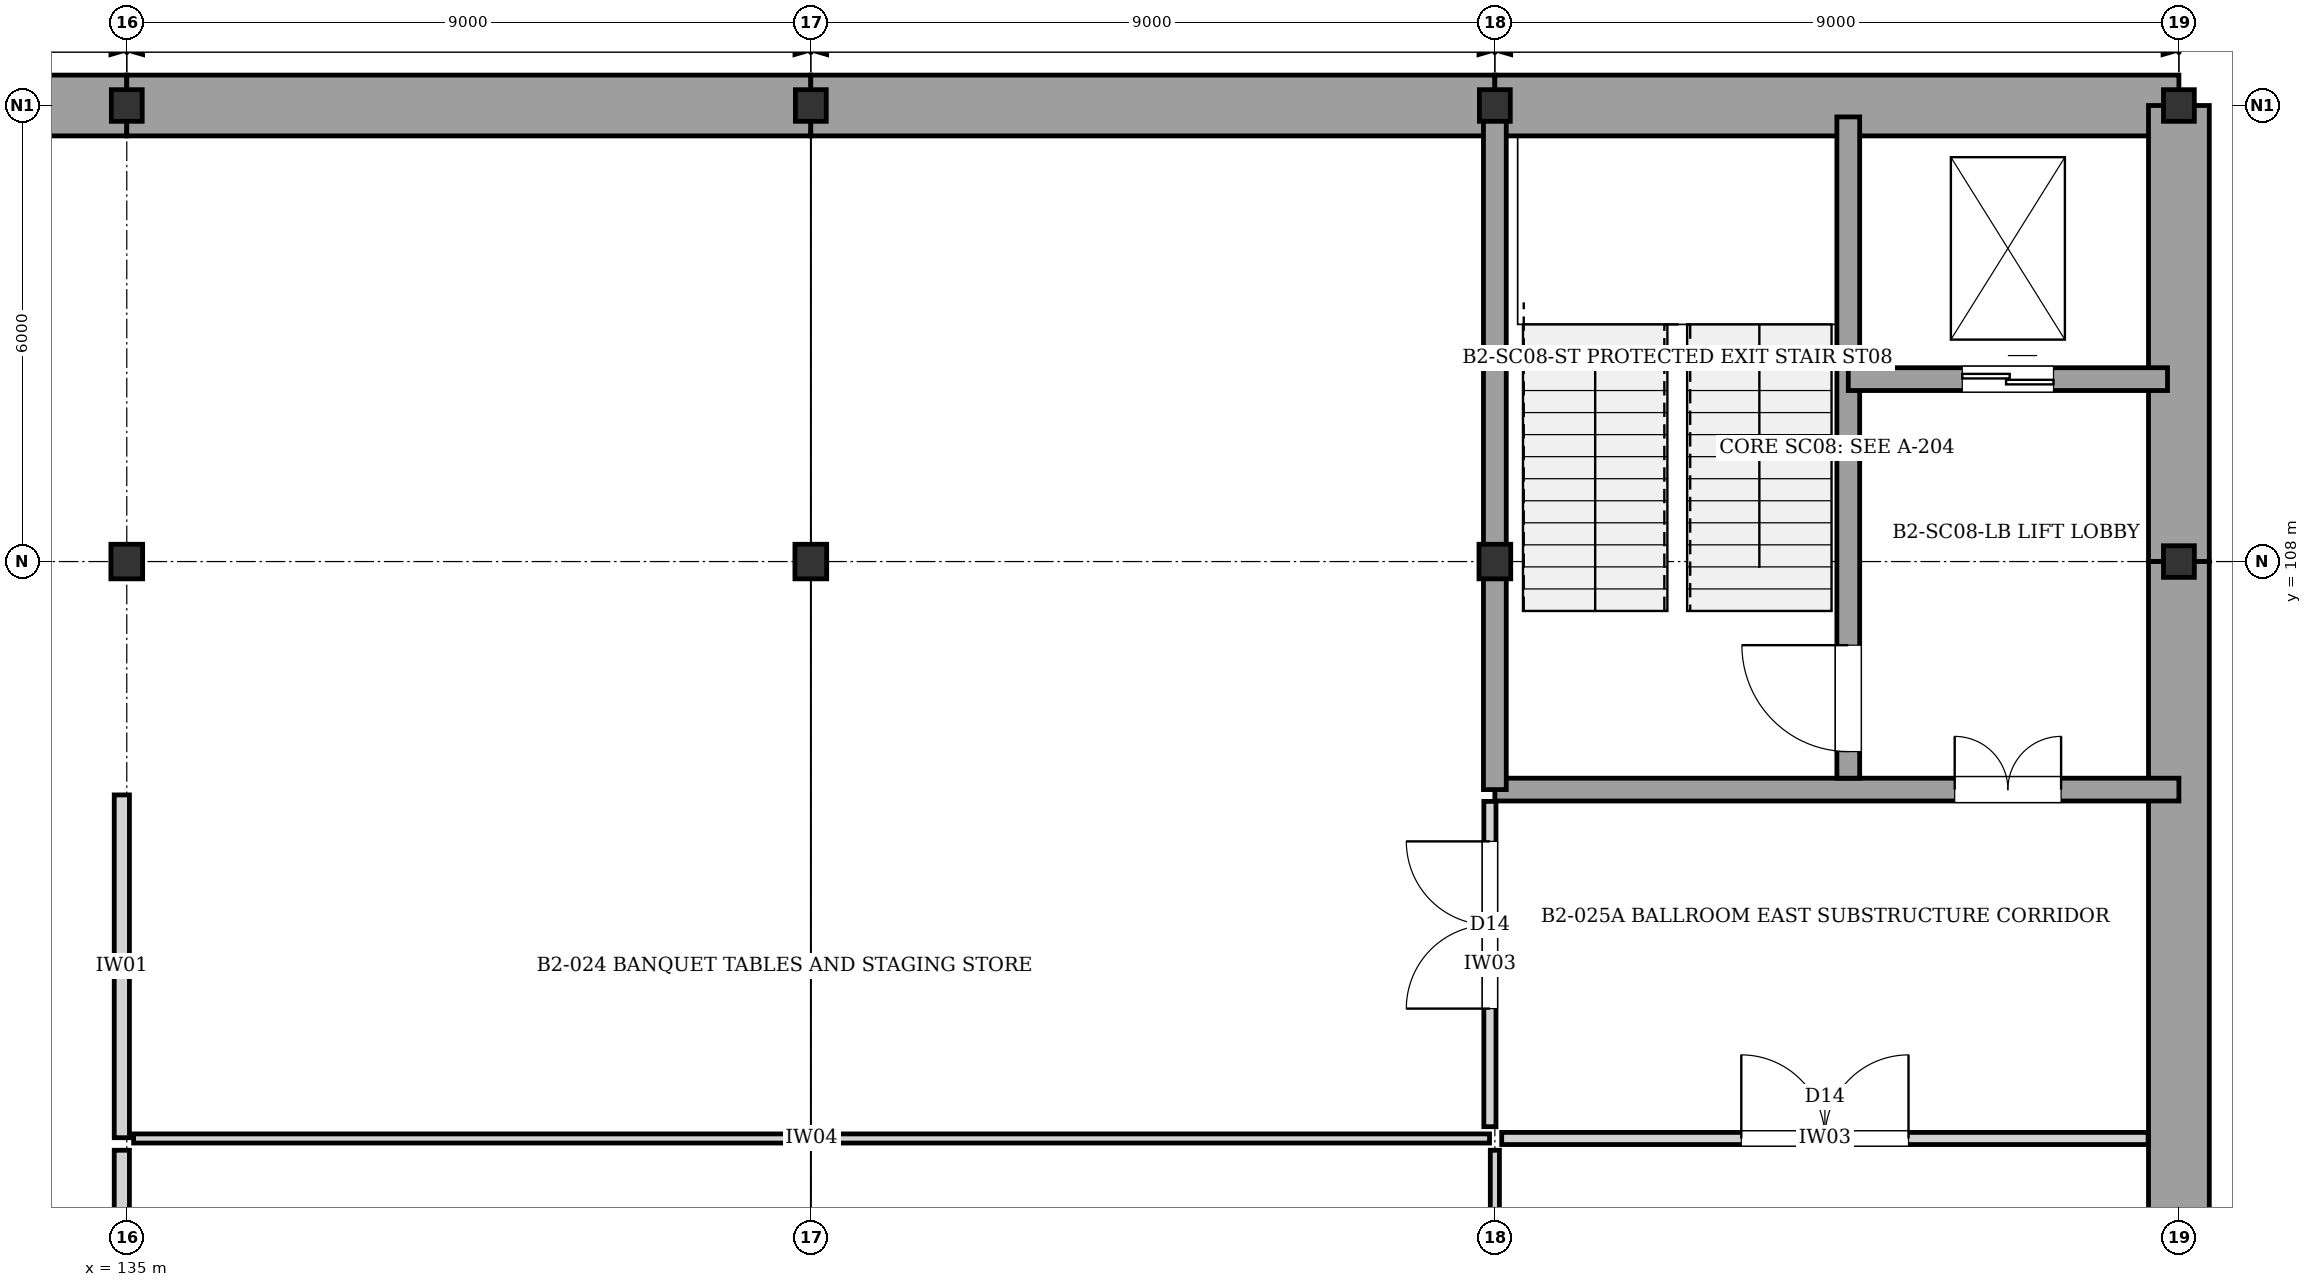
"""IFC4 building model, lengths in metres.
Left out: names, types, materials, properties, quantities, classifications, styles, units other than length and angle.
Written with IfcOpenShell. Run it as: python <this file> out.ifc"""

import sys

from ifc_helpers import new_model, si_unit, direction, frame, frame_2d, origin, origin_2d, place, context, subcontext, project, spatial, rectangle, i_section, extrude, element, fill, save


model = new_model("IFC4")
c1 = context("Model", 3, precision=1e-05, world=origin(), true_north=direction((0.0, 1.0)))
c2 = subcontext(c1, "Body", "Model", "MODEL_VIEW")
j1 = project(units=[si_unit("LENGTHUNIT", "METRE"), si_unit("PLANEANGLEUNIT", "RADIAN")], contexts=[c1])
p1 = place(None, origin())
s1 = spatial("IfcSite", under=j1, at=p1, CompositionType="ELEMENT")
p2 = place(p1, origin())
s2 = spatial("IfcBuilding", under=s1, at=p2, CompositionType="ELEMENT")
p3 = place(p2, frame((0.0, 0.0, -8.96)))
s3 = spatial("IfcBuildingStorey", under=s2, at=p3, CompositionType="ELEMENT", Elevation=-8.96)
p4 = place(p3, frame((135.0, 108.0, 0.0), z_axis=(0.0, 0.0, 1.0), x_axis=(1.0, 0.0, 0.0)))
e1 = element("IfcColumn", 1, at=p4, inside=s3, PredefinedType="COLUMN", context=c2, shape_type="SweptSolid", body=[
    extrude(i_section(OverallWidth=0.418, OverallDepth=0.455, WebThickness=0.032, FlangeThickness=0.056, at=origin_2d()), origin(), (0.0, 0.0, 1.0), 4.48),
])
p5 = place(p3, frame((135.0, 114.0, 0.0), z_axis=(0.0, 0.0, 1.0), x_axis=(1.0, 0.0, 0.0)))
e2 = element("IfcColumn", 2, at=p5, inside=s3, PredefinedType="COLUMN", context=c2, shape_type="SweptSolid", body=[
    extrude(i_section(OverallWidth=0.406, OverallDepth=0.416, WebThickness=0.022, FlangeThickness=0.038, at=origin_2d()), origin(), (0.0, 0.0, 1.0), 4.48),
])
p6 = place(p3, frame((144.0, 108.0, 0.0), z_axis=(0.0, 0.0, 1.0), x_axis=(1.0, 0.0, 0.0)))
e3 = element("IfcColumn", 3, at=p6, inside=s3, PredefinedType="COLUMN", context=c2, shape_type="SweptSolid", body=[
    extrude(i_section(OverallWidth=0.418, OverallDepth=0.455, WebThickness=0.032, FlangeThickness=0.056, at=origin_2d()), origin(), (0.0, 0.0, 1.0), 4.48),
])
p7 = place(p3, frame((144.0, 114.0, 0.0), z_axis=(0.0, 0.0, 1.0), x_axis=(1.0, 0.0, 0.0)))
e4 = element("IfcColumn", 4, at=p7, inside=s3, PredefinedType="COLUMN", context=c2, shape_type="SweptSolid", body=[
    extrude(i_section(OverallWidth=0.406, OverallDepth=0.416, WebThickness=0.022, FlangeThickness=0.038, at=origin_2d()), origin(), (0.0, 0.0, 1.0), 4.48),
])
p8 = place(p3, frame((153.0, 108.0, 0.0), z_axis=(0.0, 0.0, 1.0), x_axis=(1.0, 0.0, 0.0)))
e5 = element("IfcColumn", 5, at=p8, inside=s3, PredefinedType="COLUMN", context=c2, shape_type="SweptSolid", body=[
    extrude(i_section(OverallWidth=0.418, OverallDepth=0.455, WebThickness=0.032, FlangeThickness=0.056, at=origin_2d()), origin(), (0.0, 0.0, 1.0), 4.48),
])
for number, where, z_axis, x_axis in (
    (6, (153.0, 114.0, 0.0), (0.0, 0.0, 1.0), (1.0, 0.0, 0.0)),
    (7, (162.0, 108.0, 0.0), (0.0, 0.0, 1.0), (1.0, 0.0, 0.0)),
    (8, (162.0, 114.0, 0.0), (0.0, 0.0, 1.0), (1.0, 0.0, 0.0)),
):
    element("IfcColumn", number, at=place(p3, frame(where, z_axis=z_axis, x_axis=x_axis)), inside=s3, PredefinedType="COLUMN", context=c2, shape_type="SweptSolid", body=[
        extrude(i_section(OverallWidth=0.406, OverallDepth=0.416, WebThickness=0.022, FlangeThickness=0.038, at=origin_2d()), origin(), (0.0, 0.0, 1.0), 4.48),
    ])
for number, where, z_axis, x_axis in (
    (9, (126.0, 114.0, 0.0), (0.0, 0.0, 1.0), (1.0, 0.0, 0.0)),
    (10, (135.0, 114.0, 0.0), (0.0, 0.0, 1.0), (1.0, 0.0, 0.0)),
    (11, (144.0, 114.0, 0.0), (0.0, 0.0, 1.0), (1.0, 0.0, 0.0)),
    (12, (153.0, 114.0, 0.0), (0.0, 0.0, 1.0), (1.0, 0.0, 0.0)),
):
    element("IfcWall", number, at=place(p3, frame(where, z_axis=z_axis, x_axis=x_axis)), inside=s3, PredefinedType="USERDEFINED", context=c2, shape_type="SweptSolid", body=[
        extrude(rectangle(XDim=9.0, YDim=0.8, at=frame_2d((4.5, 0.0))), origin(), (0.0, 0.0, 1.0), 4.2),
    ])
p9 = place(p3, frame((162.0, 114.0, 0.0), z_axis=(0.0, 0.0, 1.0), x_axis=(0.0, -1.0, 0.0)))
e13 = element("IfcWall", 13, at=p9, inside=s3, PredefinedType="USERDEFINED", context=c2, shape_type="SweptSolid", body=[
    extrude(rectangle(XDim=6.0, YDim=0.8, at=frame_2d((3.0, 0.0))), origin(), (0.0, 0.0, 1.0), 4.2),
])
p10 = place(p3, frame((162.0, 108.0, 0.0), z_axis=(0.0, 0.0, 1.0), x_axis=(0.0, -1.0, 0.0)))
e14 = element("IfcWall", 14, at=p10, inside=s3, PredefinedType="USERDEFINED", context=c2, shape_type="SweptSolid", body=[
    extrude(rectangle(XDim=9.0, YDim=0.8, at=frame_2d((4.5, 0.0))), origin(), (0.0, 0.0, 1.0), 4.2),
])
p11 = place(p3, frame((153.0, 105.0, 0.0), z_axis=(0.0, 0.0, 1.0), x_axis=(1.0, 0.0, 0.0)))
e15 = element("IfcWall", 15, at=p11, inside=s3, PredefinedType="SHEAR", context=c2, shape_type="SweptSolid", body=[
    extrude(rectangle(XDim=9.0, YDim=0.3, at=frame_2d((4.5, 0.0))), origin(), (0.0, 0.0, 1.0), 4.2),
])
p12 = place(p11, frame((6.05, 0.0, 0.0)))
e16 = element("IfcOpeningElement", 16, at=p12, cuts=e15, PredefinedType="OPENING", context=c2, shape_type="SweptSolid", body=[
    extrude(rectangle(XDim=1.4, YDim=2.02, at=frame_2d((0.7, 1.01))), frame((0.0, 0.16, 0.0), z_axis=(0.0, -1.0, 0.0), x_axis=(1.0, 0.0, 0.0)), (0.0, 0.0, 1.0), 0.32),
])
p13 = place(p3, frame((153.0, 105.0, 0.0), z_axis=(0.0, 0.0, 1.0), x_axis=(0.0, 1.0, 0.0)))
e17 = element("IfcWall", 17, at=p13, inside=s3, PredefinedType="SHEAR", context=c2, shape_type="SweptSolid", body=[
    extrude(rectangle(XDim=9.0, YDim=0.3, at=frame_2d((4.5, 0.0))), origin(), (0.0, 0.0, 1.0), 4.2),
])
p14 = place(p3, frame((157.65, 105.15, 0.0), z_axis=(0.0, 0.0, 1.0), x_axis=(0.0, 1.0, 0.0)))
e18 = element("IfcWall", 18, at=p14, inside=s3, PredefinedType="SHEAR", context=c2, shape_type="SweptSolid", body=[
    extrude(rectangle(XDim=8.7, YDim=0.3, at=frame_2d((4.35, 0.0))), origin(), (0.0, 0.0, 1.0), 4.2),
])
p15 = place(p14, frame((0.35, 0.0, 0.0)))
e19 = element("IfcOpeningElement", 19, at=p15, cuts=e18, PredefinedType="OPENING", context=c2, shape_type="SweptSolid", body=[
    extrude(rectangle(XDim=1.4, YDim=2.02, at=frame_2d((0.7, 1.01))), frame((0.0, 0.16, 0.0), z_axis=(0.0, -1.0, 0.0), x_axis=(1.0, 0.0, 0.0)), (0.0, 0.0, 1.0), 0.32),
])
p16 = place(p3, frame((157.65, 110.4, 0.0), z_axis=(0.0, 0.0, 1.0), x_axis=(1.0, 0.0, 0.0)))
e20 = element("IfcWall", 20, at=p16, inside=s3, PredefinedType="SHEAR", context=c2, shape_type="SweptSolid", body=[
    extrude(rectangle(XDim=4.2, YDim=0.3, at=frame_2d((2.1, 0.0))), origin(), (0.0, 0.0, 1.0), 4.2),
])
p17 = place(p16, frame((1.5, 0.0, 0.0)))
e21 = element("IfcOpeningElement", 21, at=p17, cuts=e20, PredefinedType="OPENING", context=c2, shape_type="SweptSolid", body=[
    extrude(rectangle(XDim=1.2, YDim=2.2, at=frame_2d((0.6, 1.1))), frame((0.0, 0.16, 0.0), z_axis=(0.0, -1.0, 0.0), x_axis=(1.0, 0.0, 0.0)), (0.0, 0.0, 1.0), 0.32),
])
p18 = place(p3, frame((134.935, 100.42, 0.0), z_axis=(0.0, 0.0, 1.0), x_axis=(0.0, 1.0, 0.0)))
e22 = element("IfcWall", 22, at=p18, inside=s3, PredefinedType="PARTITIONING", context=c2, shape_type="SweptSolid", body=[
    extrude(rectangle(XDim=4.51, YDim=0.2, at=frame_2d((2.255, 0.0))), origin(), (0.0, 0.0, 1.0), 3.3),
])
p19 = place(p3, frame((135.09, 100.41, 0.0), z_axis=(0.0, 0.0, 1.0), x_axis=(1.0, 0.0, 0.0)))
e23 = element("IfcWall", 23, at=p19, inside=s3, PredefinedType="PARTITIONING", context=c2, shape_type="SweptSolid", body=[
    extrude(rectangle(XDim=17.84, YDim=0.12, at=frame_2d((8.92, 0.0))), origin(), (0.0, 0.0, 1.0), 4.2),
])
p20 = place(p3, frame((153.0, 72.405, 0.0), z_axis=(0.0, 0.0, 1.0), x_axis=(0.0, 1.0, 0.0)))
e24 = element("IfcWall", 24, at=p20, inside=s3, PredefinedType="PARTITIONING", context=c2, shape_type="SweptSolid", body=[
    extrude(rectangle(XDim=27.85, YDim=0.12, at=frame_2d((13.925, 0.0))), origin(), (0.0, 0.0, 1.0), 3.3),
])
p21 = place(p3, frame((134.935, 72.405, 0.0), z_axis=(0.0, 0.0, 1.0), x_axis=(0.0, 1.0, 0.0)))
e25 = element("IfcWall", 25, at=p21, inside=s3, PredefinedType="PARTITIONING", context=c2, shape_type="SweptSolid", body=[
    extrude(rectangle(XDim=27.85, YDim=0.2, at=frame_2d((13.925, 0.0))), origin(), (0.0, 0.0, 1.0), 3.3),
])
p22 = place(p21, frame((13.425, 0.0, 0.0)))
e26 = element("IfcOpeningElement", 26, at=p22, cuts=e25, PredefinedType="OPENING", context=c2, shape_type="SweptSolid", body=[
    extrude(rectangle(XDim=1.0, YDim=2.1, at=frame_2d((0.5, 1.05))), frame((0.0, 0.11, 0.0), z_axis=(0.0, -1.0, 0.0), x_axis=(1.0, 0.0, 0.0)), (0.0, 0.0, 1.0), 0.22),
])
p23 = place(p3, frame((152.935, 100.565, 0.0), z_axis=(0.0, 0.0, 1.0), x_axis=(0.0, 1.0, 0.0)))
e27 = element("IfcWall", 27, at=p23, inside=s3, PredefinedType="PARTITIONING", context=c2, shape_type="SweptSolid", body=[
    extrude(rectangle(XDim=4.28, YDim=0.16, at=frame_2d((2.14, 0.0))), origin(), (0.0, 0.0, 1.0), 3.3),
])
p24 = place(p23, frame((1.554, 0.0, 0.0)))
e28 = element("IfcOpeningElement", 28, at=p24, cuts=e27, PredefinedType="OPENING", context=c2, shape_type="SweptSolid", body=[
    extrude(rectangle(XDim=2.2, YDim=2.45, at=frame_2d((1.1, 1.225))), frame((0.0, 0.09, 0.0), z_axis=(0.0, -1.0, 0.0), x_axis=(1.0, 0.0, 0.0)), (0.0, 0.0, 1.0), 0.18),
])
p25 = place(p3, frame((153.09, 100.41, 0.0), z_axis=(0.0, 0.0, 1.0), x_axis=(1.0, 0.0, 0.0)))
e29 = element("IfcWall", 29, at=p25, inside=s3, PredefinedType="PARTITIONING", context=c2, shape_type="SweptSolid", body=[
    extrude(rectangle(XDim=8.505, YDim=0.16, at=frame_2d((4.252, 0.0))), origin(), (0.0, 0.0, 1.0), 4.2),
])
p26 = place(p25, frame((3.153, 0.0, 0.0)))
e30 = element("IfcOpeningElement", 30, at=p26, cuts=e29, PredefinedType="OPENING", context=c2, shape_type="SweptSolid", body=[
    extrude(rectangle(XDim=2.2, YDim=2.45, at=frame_2d((1.1, 1.225))), frame((0.0, 0.09, 0.0), z_axis=(0.0, -1.0, 0.0), x_axis=(1.0, 0.0, 0.0)), (0.0, 0.0, 1.0), 0.18),
])
p27 = place(p12, origin())
e31 = element("IfcDoor", 31, at=p27, inside=s3, OperationType="DOUBLE_DOOR_SINGLE_SWING", PredefinedType="DOOR", context=c2, shape_type="SweptSolid", body=[
    extrude(rectangle(XDim=1.4, YDim=2.02, at=frame_2d((0.7, 1.01))), frame((0.0, 0.025, 0.0), z_axis=(0.0, -1.0, 0.0), x_axis=(1.0, 0.0, 0.0)), (0.0, 0.0, 1.0), 0.05),
])
fill(e16, e31)
p28 = place(p15, origin())
e32 = element("IfcDoor", 32, at=p28, inside=s3, OperationType="SINGLE_SWING_RIGHT", PredefinedType="DOOR", context=c2, shape_type="SweptSolid", body=[
    extrude(rectangle(XDim=1.4, YDim=2.02, at=frame_2d((0.7, 1.01))), frame((0.0, 0.025, 0.0), z_axis=(0.0, -1.0, 0.0), x_axis=(1.0, 0.0, 0.0)), (0.0, 0.0, 1.0), 0.05),
])
fill(e19, e32)
p29 = place(p17, origin())
e33 = element("IfcDoor", 33, at=p29, inside=s3, OperationType="DOUBLE_DOOR_SLIDING", PredefinedType="DOOR", context=c2, shape_type="SweptSolid", body=[
    extrude(rectangle(XDim=1.2, YDim=2.2, at=frame_2d((0.6, 1.1))), frame((0.0, 0.025, 0.0), z_axis=(0.0, -1.0, 0.0), x_axis=(1.0, 0.0, 0.0)), (0.0, 0.0, 1.0), 0.05),
])
fill(e21, e33)
p30 = place(p24, origin())
e34 = element("IfcDoor", 34, at=p30, inside=s3, OperationType="DOUBLE_DOOR_SINGLE_SWING", PredefinedType="DOOR", context=c2, shape_type="SweptSolid", body=[
    extrude(rectangle(XDim=2.2, YDim=2.45, at=frame_2d((1.1, 1.225))), frame((0.0, 0.025, 0.0), z_axis=(0.0, -1.0, 0.0), x_axis=(1.0, 0.0, 0.0)), (0.0, 0.0, 1.0), 0.05),
])
fill(e28, e34)
p31 = place(p26, origin())
e35 = element("IfcDoor", 35, at=p31, inside=s3, OperationType="DOUBLE_DOOR_SINGLE_SWING", PredefinedType="DOOR", context=c2, shape_type="SweptSolid", body=[
    extrude(rectangle(XDim=2.2, YDim=2.45, at=frame_2d((1.1, 1.225))), frame((0.0, 0.025, 0.0), z_axis=(0.0, -1.0, 0.0), x_axis=(1.0, 0.0, 0.0)), (0.0, 0.0, 1.0), 0.05),
])
fill(e30, e35)
save(model, sys.argv[1])
